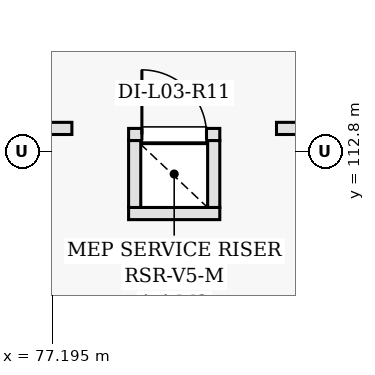
"""IFC4 building model, lengths in metres.
Left out: names, types, materials, properties, quantities, classifications, styles, units other than length and angle.
Written with IfcOpenShell. Run it as: python <this file> out.ifc"""

import sys

from ifc_helpers import new_model, si_unit, direction, frame, frame_2d, origin, place, context, subcontext, project, spatial, rectangle, extrude, element, fill, save


model = new_model("IFC4")
c1 = context("Model", 3, precision=1e-05, world=origin(), true_north=direction((0.0, 1.0)))
c2 = subcontext(c1, "Body", "Model", "MODEL_VIEW")
j1 = project(units=[si_unit("LENGTHUNIT", "METRE"), si_unit("PLANEANGLEUNIT", "RADIAN")], contexts=[c1])
p1 = place(None, origin())
s1 = spatial("IfcSite", under=j1, at=p1, CompositionType="ELEMENT")
p2 = place(p1, origin())
s2 = spatial("IfcBuilding", under=s1, at=p2, CompositionType="ELEMENT")
p3 = place(p2, frame((0.0, 0.0, 13.8)))
s3 = spatial("IfcBuildingStorey", under=s2, at=p3, CompositionType="ELEMENT", Elevation=13.8)
p4 = place(p3, frame((78.2, 111.98, 0.0), z_axis=(0.0, 0.0, 1.0), x_axis=(1.0, 0.0, 0.0)))
e1 = element("IfcWall", 1, at=p4, inside=s3, PredefinedType="PARTITIONING", context=c2, shape_type="SweptSolid", body=[
    extrude(rectangle(XDim=1.2, YDim=0.16, at=frame_2d((0.6, 0.0))), origin(), (0.0, 0.0, 1.0), 3.96),
])
p5 = place(p3, frame((78.2, 113.02, 0.0), z_axis=(0.0, 0.0, 1.0), x_axis=(1.0, 0.0, 0.0)))
e2 = element("IfcWall", 2, at=p5, inside=s3, PredefinedType="PARTITIONING", context=c2, shape_type="SweptSolid", body=[
    extrude(rectangle(XDim=1.2, YDim=0.16, at=frame_2d((0.6, 0.0))), origin(), (0.0, 0.0, 1.0), 3.96),
])
p6 = place(p5, frame((0.175, 0.0, 0.0)))
e3 = element("IfcOpeningElement", 3, at=p6, cuts=e2, PredefinedType="OPENING", context=c2, shape_type="SweptSolid", body=[
    extrude(rectangle(XDim=0.85, YDim=2.02, at=frame_2d((0.425, 1.01))), frame((0.0, 0.09, 0.0), z_axis=(0.0, -1.0, 0.0), x_axis=(1.0, 0.0, 0.0)), (0.0, 0.0, 1.0), 0.18),
])
for number, where, z_axis, x_axis in (
    (4, (78.28, 112.06, 0.0), (0.0, 0.0, 1.0), (0.0, 1.0, 0.0)),
    (5, (79.32, 112.06, 0.0), (0.0, 0.0, 1.0), (0.0, 1.0, 0.0)),
):
    element("IfcWall", number, at=place(p3, frame(where, z_axis=z_axis, x_axis=x_axis)), inside=s3, PredefinedType="PARTITIONING", context=c2, shape_type="SweptSolid", body=[
        extrude(rectangle(XDim=0.88, YDim=0.16, at=frame_2d((0.44, 0.0))), origin(), (0.0, 0.0, 1.0), 3.96),
    ])
p7 = place(p3, frame((80.146, 113.1, 0.0), z_axis=(0.0, 0.0, 1.0), x_axis=(1.0, 0.0, 0.0)))
e6 = element("IfcWall", 6, at=p7, inside=s3, PredefinedType="PARTITIONING", context=c2, shape_type="SweptSolid", body=[
    extrude(rectangle(XDim=4.834, YDim=0.16, at=frame_2d((2.417, 0.0))), origin(), (0.0, 0.0, 1.0), 3.295),
])
p8 = place(p3, frame((39.44, 113.1, 0.0), z_axis=(0.0, 0.0, 1.0), x_axis=(1.0, 0.0, 0.0)))
e7 = element("IfcWall", 7, at=p8, inside=s3, PredefinedType="PARTITIONING", context=c2, shape_type="SweptSolid", body=[
    extrude(rectangle(XDim=38.014, YDim=0.16, at=frame_2d((19.007, 0.0))), origin(), (0.0, 0.0, 1.0), 3.045),
])
p9 = place(p6, origin())
e8 = element("IfcDoor", 8, at=p9, inside=s3, OperationType="SINGLE_SWING_LEFT", PredefinedType="DOOR", context=c2, shape_type="SweptSolid", body=[
    extrude(rectangle(XDim=0.85, YDim=2.02, at=frame_2d((0.425, 1.01))), frame((0.0, 0.025, 0.0), z_axis=(0.0, -1.0, 0.0), x_axis=(1.0, 0.0, 0.0)), (0.0, 0.0, 1.0), 0.05),
])
fill(e3, e8)
save(model, sys.argv[1])
